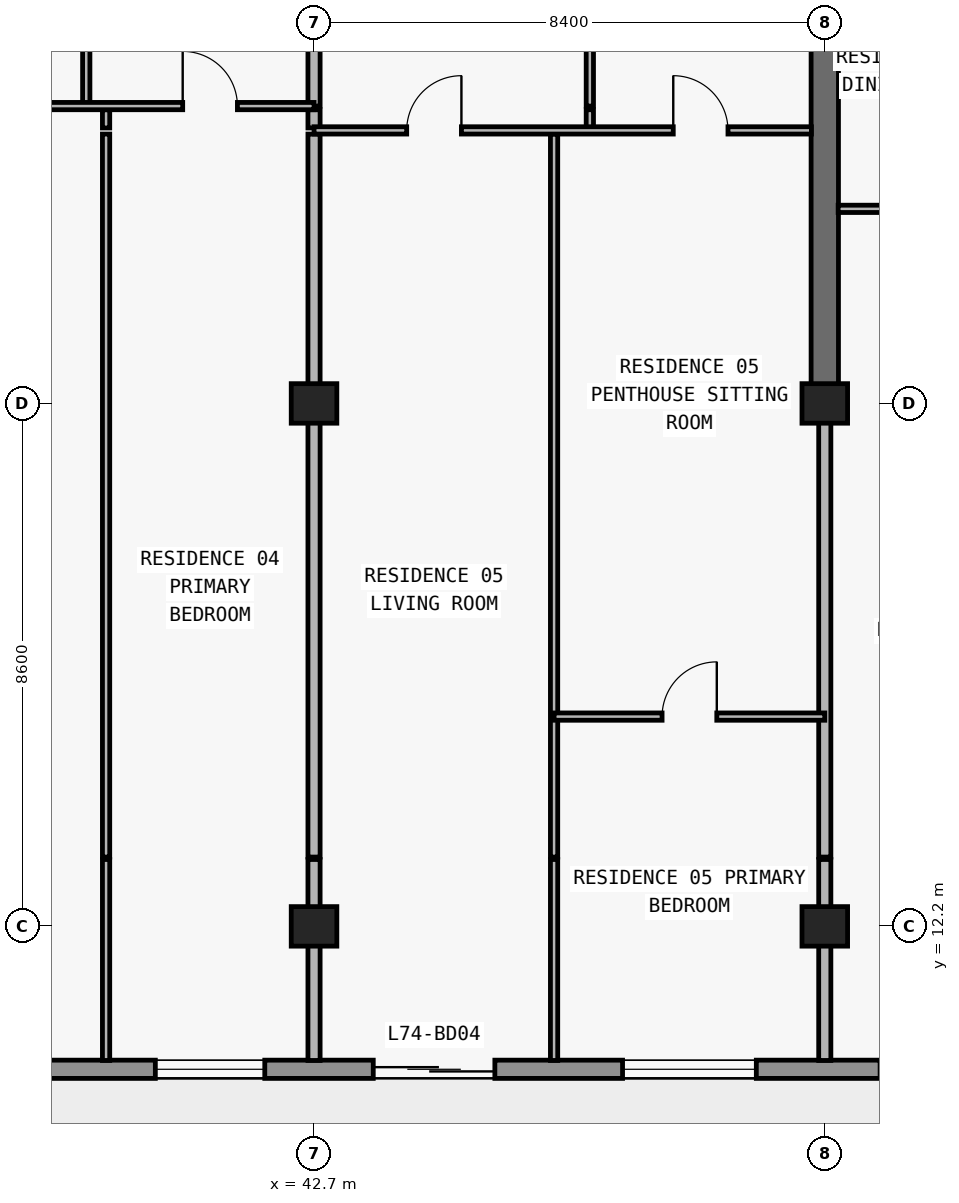
"""IFC4 building model, lengths in metres.
Left out: names, types, materials, properties, quantities, classifications, styles, units other than length and angle.
Written with IfcOpenShell. Run it as: python <this file> out.ifc"""

import sys

from ifc_helpers import new_model, si_unit, direction, frame, frame_2d, origin, origin_2d, place, context, subcontext, project, spatial, rectangle, extrude, element, fill, save


model = new_model("IFC4")
c1 = context("Model", 3, precision=1e-05, world=origin(), true_north=direction((0.0, 1.0)))
c2 = subcontext(c1, "Body", "Model", "MODEL_VIEW")
j1 = project(units=[si_unit("LENGTHUNIT", "METRE"), si_unit("PLANEANGLEUNIT", "RADIAN")], contexts=[c1])
p1 = place(None, origin())
s1 = spatial("IfcSite", under=j1, at=p1, CompositionType="ELEMENT")
p2 = place(p1, origin())
s2 = spatial("IfcBuilding", under=s1, at=p2, CompositionType="ELEMENT")
p3 = place(p2, frame((0.0, 0.0, 262.8)))
s3 = spatial("IfcBuildingStorey", under=s2, at=p3, CompositionType="ELEMENT", Elevation=262.8)
for number, where, z_axis, x_axis in (
    (1, (42.7, 12.2, 0.0), (0.0, 0.0, 1.0), (1.0, 0.0, 0.0)),
    (2, (51.1, 12.2, 0.0), (0.0, 0.0, 1.0), (1.0, 0.0, 0.0)),
    (3, (42.7, 20.8, 0.0), (0.0, 0.0, 1.0), (1.0, 0.0, 0.0)),
    (4, (51.1, 20.8, 0.0), (0.0, 0.0, 1.0), (1.0, 0.0, 0.0)),
):
    element("IfcColumn", number, at=place(p3, frame(where, z_axis=z_axis, x_axis=x_axis)), inside=s3, PredefinedType="COLUMN", context=c2, shape_type="SweptSolid", body=[
        extrude(rectangle(XDim=0.75, YDim=0.65, at=origin_2d()), origin(), (0.0, 0.0, 1.0), 3.05),
    ])
p4 = place(p3, frame((51.1, 20.8, 0.0), z_axis=(0.0, 0.0, 1.0), x_axis=(0.0, 1.0, 0.0)))
e5 = element("IfcWall", 5, at=p4, inside=s3, PredefinedType="SHEAR", context=c2, shape_type="SweptSolid", body=[
    extrude(rectangle(XDim=8.6, YDim=0.45, at=frame_2d((4.3, 0.0))), origin(), (0.0, 0.0, 1.0), 3.05),
])
p5 = place(p3, frame((65.7, 9.85, 0.0), z_axis=(0.0, 0.0, 1.0), x_axis=(-1.0, 0.0, 0.0)))
e6 = element("IfcWall", 6, at=p5, inside=s3, PredefinedType="STANDARD", context=c2, shape_type="SweptSolid", body=[
    extrude(rectangle(XDim=53.6, YDim=0.3, at=frame_2d((26.8, 0.0))), origin(), (0.0, 0.0, 1.0), 3.05),
])
p6 = place(p5, frame((48.05, 0.0, 0.85)))
e7 = element("IfcOpeningElement", 7, at=p6, cuts=e6, PredefinedType="OPENING", context=c2, shape_type="SweptSolid", body=[
    extrude(rectangle(XDim=1.8, YDim=1.55, at=frame_2d((0.9, 0.775))), frame((0.0, 0.16, 0.0), z_axis=(0.0, -1.0, 0.0), x_axis=(1.0, 0.0, 0.0)), (0.0, 0.0, 1.0), 0.32),
])
p7 = place(p5, frame((44.09, 0.0, 0.0)))
e8 = element("IfcOpeningElement", 8, at=p7, cuts=e6, PredefinedType="OPENING", context=c2, shape_type="SweptSolid", body=[
    extrude(rectangle(XDim=2.0, YDim=2.3, at=frame_2d((1.0, 1.15))), frame((0.0, 0.16, 0.0), z_axis=(0.0, -1.0, 0.0), x_axis=(1.0, 0.0, 0.0)), (0.0, 0.0, 1.0), 0.32),
])
p8 = place(p5, frame((39.99, 0.0, 0.85)))
e9 = element("IfcOpeningElement", 9, at=p8, cuts=e6, PredefinedType="OPENING", context=c2, shape_type="SweptSolid", body=[
    extrude(rectangle(XDim=1.8, YDim=1.55, at=frame_2d((0.9, 0.775))), frame((0.0, 0.16, 0.0), z_axis=(0.0, -1.0, 0.0), x_axis=(1.0, 0.0, 0.0)), (0.0, 0.0, 1.0), 0.32),
])
p9 = place(p5, frame((36.026, 0.0, 0.0)))
e10 = element("IfcOpeningElement", 10, at=p9, cuts=e6, PredefinedType="OPENING", context=c2, shape_type="SweptSolid", body=[
    extrude(rectangle(XDim=2.0, YDim=2.3, at=frame_2d((1.0, 1.15))), frame((0.0, 0.16, 0.0), z_axis=(0.0, -1.0, 0.0), x_axis=(1.0, 0.0, 0.0)), (0.0, 0.0, 1.0), 0.32),
])
p10 = place(p5, frame((31.726, 0.0, 0.85)))
e11 = element("IfcOpeningElement", 11, at=p10, cuts=e6, PredefinedType="OPENING", context=c2, shape_type="SweptSolid", body=[
    extrude(rectangle(XDim=2.2, YDim=1.55, at=frame_2d((1.1, 0.775))), frame((0.0, 0.16, 0.0), z_axis=(0.0, -1.0, 0.0), x_axis=(1.0, 0.0, 0.0)), (0.0, 0.0, 1.0), 0.32),
])
p11 = place(p5, frame((27.51, 0.0, 0.0)))
e12 = element("IfcOpeningElement", 12, at=p11, cuts=e6, PredefinedType="OPENING", context=c2, shape_type="SweptSolid", body=[
    extrude(rectangle(XDim=2.0, YDim=2.3, at=frame_2d((1.0, 1.15))), frame((0.0, 0.16, 0.0), z_axis=(0.0, -1.0, 0.0), x_axis=(1.0, 0.0, 0.0)), (0.0, 0.0, 1.0), 0.32),
])
p12 = place(p5, frame((23.81, 0.0, 0.85)))
e13 = element("IfcOpeningElement", 13, at=p12, cuts=e6, PredefinedType="OPENING", context=c2, shape_type="SweptSolid", body=[
    extrude(rectangle(XDim=1.8, YDim=1.55, at=frame_2d((0.9, 0.775))), frame((0.0, 0.16, 0.0), z_axis=(0.0, -1.0, 0.0), x_axis=(1.0, 0.0, 0.0)), (0.0, 0.0, 1.0), 0.32),
])
p13 = place(p5, frame((20.026, 0.0, 0.0)))
e14 = element("IfcOpeningElement", 14, at=p13, cuts=e6, PredefinedType="OPENING", context=c2, shape_type="SweptSolid", body=[
    extrude(rectangle(XDim=2.0, YDim=2.3, at=frame_2d((1.0, 1.15))), frame((0.0, 0.16, 0.0), z_axis=(0.0, -1.0, 0.0), x_axis=(1.0, 0.0, 0.0)), (0.0, 0.0, 1.0), 0.32),
])
p14 = place(p5, frame((15.726, 0.0, 0.85)))
e15 = element("IfcOpeningElement", 15, at=p14, cuts=e6, PredefinedType="OPENING", context=c2, shape_type="SweptSolid", body=[
    extrude(rectangle(XDim=2.2, YDim=1.55, at=frame_2d((1.1, 0.775))), frame((0.0, 0.16, 0.0), z_axis=(0.0, -1.0, 0.0), x_axis=(1.0, 0.0, 0.0)), (0.0, 0.0, 1.0), 0.32),
])
p15 = place(p5, frame((11.69, 0.0, 0.0)))
e16 = element("IfcOpeningElement", 16, at=p15, cuts=e6, PredefinedType="OPENING", context=c2, shape_type="SweptSolid", body=[
    extrude(rectangle(XDim=2.0, YDim=2.3, at=frame_2d((1.0, 1.15))), frame((0.0, 0.16, 0.0), z_axis=(0.0, -1.0, 0.0), x_axis=(1.0, 0.0, 0.0)), (0.0, 0.0, 1.0), 0.32),
])
p16 = place(p5, frame((7.01, 0.0, 0.65)))
e17 = element("IfcOpeningElement", 17, at=p16, cuts=e6, PredefinedType="OPENING", context=c2, shape_type="SweptSolid", body=[
    extrude(rectangle(XDim=2.6, YDim=1.85, at=frame_2d((1.3, 0.925))), frame((0.0, 0.16, 0.0), z_axis=(0.0, -1.0, 0.0), x_axis=(1.0, 0.0, 0.0)), (0.0, 0.0, 1.0), 0.32),
])
p17 = place(p5, frame((2.0, 0.0, 0.85)))
e18 = element("IfcOpeningElement", 18, at=p17, cuts=e6, PredefinedType="OPENING", context=c2, shape_type="SweptSolid", body=[
    extrude(rectangle(XDim=2.2, YDim=1.55, at=frame_2d((1.1, 0.775))), frame((0.0, 0.16, 0.0), z_axis=(0.0, -1.0, 0.0), x_axis=(1.0, 0.0, 0.0)), (0.0, 0.0, 1.0), 0.32),
])
p18 = place(p3, frame((38.954, 25.69, 0.0), z_axis=(0.0, 0.0, 1.0), x_axis=(0.0, 1.0, 0.0)))
e19 = element("IfcWall", 19, at=p18, inside=s3, PredefinedType="PARTITIONING", context=c2, shape_type="SweptSolid", body=[
    extrude(rectangle(XDim=4.69, YDim=0.12, at=frame_2d((2.345, 0.0))), origin(), (0.0, 0.0, 1.0), 2.725),
])
p19 = place(p18, frame((1.895, 0.0, 0.0)))
e20 = element("IfcOpeningElement", 20, at=p19, cuts=e19, PredefinedType="OPENING", context=c2, shape_type="SweptSolid", body=[
    extrude(rectangle(XDim=0.9, YDim=2.15, at=frame_2d((0.45, 1.075))), frame((0.0, 0.07, 0.0), z_axis=(0.0, -1.0, 0.0), x_axis=(1.0, 0.0, 0.0)), (0.0, 0.0, 1.0), 0.14),
])
p20 = place(p3, frame((39.28, 9.995, 0.0), z_axis=(0.0, 0.0, 1.0), x_axis=(0.0, 1.0, 0.0)))
e21 = element("IfcWall", 21, at=p20, inside=s3, PredefinedType="PARTITIONING", context=c2, shape_type="SweptSolid", body=[
    extrude(rectangle(XDim=3.305, YDim=0.12, at=frame_2d((1.652, 0.0))), origin(), (0.0, 0.0, 1.0), 3.05),
])
p21 = place(p3, frame((39.28, 13.34, 0.0), z_axis=(0.0, 0.0, 1.0), x_axis=(0.0, 1.0, 0.0)))
e22 = element("IfcWall", 22, at=p21, inside=s3, PredefinedType="PARTITIONING", context=c2, shape_type="SweptSolid", body=[
    extrude(rectangle(XDim=11.89, YDim=0.12, at=frame_2d((5.945, 0.0))), origin(), (0.0, 0.0, 1.0), 3.05),
])
p22 = place(p3, frame((39.28, 25.33, 0.0), z_axis=(0.0, 0.0, 1.0), x_axis=(0.0, 1.0, 0.0)))
e23 = element("IfcWall", 23, at=p22, inside=s3, PredefinedType="PARTITIONING", context=c2, shape_type="SweptSolid", body=[
    extrude(rectangle(XDim=0.3, YDim=0.12, at=frame_2d((0.15, 0.0))), origin(), (0.0, 0.0, 1.0), 3.05),
])
p23 = place(p3, frame((42.7, 9.995, 0.0), z_axis=(0.0, 0.0, 1.0), x_axis=(0.0, 1.0, 0.0)))
e24 = element("IfcWall", 24, at=p23, inside=s3, PredefinedType="PARTITIONING", context=c2, shape_type="SweptSolid", body=[
    extrude(rectangle(XDim=3.305, YDim=0.2, at=frame_2d((1.652, 0.0))), origin(), (0.0, 0.0, 1.0), 2.263),
])
p24 = place(p3, frame((42.7, 13.34, 0.0), z_axis=(0.0, 0.0, 1.0), x_axis=(0.0, 1.0, 0.0)))
e25 = element("IfcWall", 25, at=p24, inside=s3, PredefinedType="PARTITIONING", context=c2, shape_type="SweptSolid", body=[
    extrude(rectangle(XDim=11.89, YDim=0.2, at=frame_2d((5.945, 0.0))), origin(), (0.0, 0.0, 1.0), 2.263),
])
p25 = place(p3, frame((42.7, 25.33, 0.0), z_axis=(0.0, 0.0, 1.0), x_axis=(0.0, 1.0, 0.0)))
e26 = element("IfcWall", 26, at=p25, inside=s3, PredefinedType="PARTITIONING", context=c2, shape_type="SweptSolid", body=[
    extrude(rectangle(XDim=0.3, YDim=0.2, at=frame_2d((0.15, 0.0))), origin(), (0.0, 0.0, 1.0), 2.263),
])
p26 = place(p3, frame((42.7, 25.69, 0.0), z_axis=(0.0, 0.0, 1.0), x_axis=(0.0, 1.0, 0.0)))
e27 = element("IfcWall", 27, at=p26, inside=s3, PredefinedType="PARTITIONING", context=c2, shape_type="SweptSolid", body=[
    extrude(rectangle(XDim=4.69, YDim=0.2, at=frame_2d((2.345, 0.0))), origin(), (0.0, 0.0, 1.0), 2.263),
])
p27 = place(p3, frame((46.648, 9.995, 0.0), z_axis=(0.0, 0.0, 1.0), x_axis=(0.0, 1.0, 0.0)))
e28 = element("IfcWall", 28, at=p27, inside=s3, PredefinedType="PARTITIONING", context=c2, shape_type="SweptSolid", body=[
    extrude(rectangle(XDim=3.305, YDim=0.12, at=frame_2d((1.652, 0.0))), origin(), (0.0, 0.0, 1.0), 3.05),
])
p28 = place(p3, frame((46.648, 13.34, 0.0), z_axis=(0.0, 0.0, 1.0), x_axis=(0.0, 1.0, 0.0)))
e29 = element("IfcWall", 29, at=p28, inside=s3, PredefinedType="PARTITIONING", context=c2, shape_type="SweptSolid", body=[
    extrude(rectangle(XDim=11.89, YDim=0.12, at=frame_2d((5.945, 0.0))), origin(), (0.0, 0.0, 1.0), 3.05),
])
p29 = place(p3, frame((47.236, 25.33, 0.0), z_axis=(0.0, 0.0, 1.0), x_axis=(0.0, 1.0, 0.0)))
e30 = element("IfcWall", 30, at=p29, inside=s3, PredefinedType="PARTITIONING", context=c2, shape_type="SweptSolid", body=[
    extrude(rectangle(XDim=0.3, YDim=0.12, at=frame_2d((0.15, 0.0))), origin(), (0.0, 0.0, 1.0), 3.05),
])
p30 = place(p3, frame((47.236, 25.69, 0.0), z_axis=(0.0, 0.0, 1.0), x_axis=(0.0, 1.0, 0.0)))
e31 = element("IfcWall", 31, at=p30, inside=s3, PredefinedType="PARTITIONING", context=c2, shape_type="SweptSolid", body=[
    extrude(rectangle(XDim=4.69, YDim=0.12, at=frame_2d((2.345, 0.0))), origin(), (0.0, 0.0, 1.0), 3.05),
])
p31 = place(p30, frame((1.895, 0.0, 0.0)))
e32 = element("IfcOpeningElement", 32, at=p31, cuts=e31, PredefinedType="OPENING", context=c2, shape_type="SweptSolid", body=[
    extrude(rectangle(XDim=0.9, YDim=2.15, at=frame_2d((0.45, 1.075))), frame((0.0, 0.07, 0.0), z_axis=(0.0, -1.0, 0.0), x_axis=(1.0, 0.0, 0.0)), (0.0, 0.0, 1.0), 0.14),
])
p32 = place(p3, frame((51.1, 9.995, 0.0), z_axis=(0.0, 0.0, 1.0), x_axis=(0.0, 1.0, 0.0)))
e33 = element("IfcWall", 33, at=p32, inside=s3, PredefinedType="PARTITIONING", context=c2, shape_type="SweptSolid", body=[
    extrude(rectangle(XDim=3.305, YDim=0.2, at=frame_2d((1.652, 0.0))), origin(), (0.0, 0.0, 1.0), 2.263),
])
p33 = place(p3, frame((51.1, 13.34, 0.0), z_axis=(0.0, 0.0, 1.0), x_axis=(0.0, 1.0, 0.0)))
e34 = element("IfcWall", 34, at=p33, inside=s3, PredefinedType="PARTITIONING", context=c2, shape_type="SweptSolid", body=[
    extrude(rectangle(XDim=7.455, YDim=0.2, at=frame_2d((3.728, 0.0))), origin(), (0.0, 0.0, 1.0), 2.263),
])
p34 = place(p3, frame((46.648, 15.65, 0.0), z_axis=(0.0, 0.0, 1.0), x_axis=(1.0, 0.0, 0.0)))
e35 = element("IfcWall", 35, at=p34, inside=s3, PredefinedType="PARTITIONING", context=c2, shape_type="SweptSolid", body=[
    extrude(rectangle(XDim=4.452, YDim=0.12, at=frame_2d((2.226, 0.0))), origin(), (0.0, 0.0, 1.0), 3.05),
])
p35 = place(p34, frame((1.776, 0.0, 0.0)))
e36 = element("IfcOpeningElement", 36, at=p35, cuts=e35, PredefinedType="OPENING", context=c2, shape_type="SweptSolid", body=[
    extrude(rectangle(XDim=0.9, YDim=2.15, at=frame_2d((0.45, 1.075))), frame((0.0, 0.07, 0.0), z_axis=(0.0, -1.0, 0.0), x_axis=(1.0, 0.0, 0.0)), (0.0, 0.0, 1.0), 0.14),
])
p36 = place(p3, frame((51.32, 24.0, 0.0), z_axis=(0.0, 0.0, 1.0), x_axis=(1.0, 0.0, 0.0)))
e37 = element("IfcWall", 37, at=p36, inside=s3, PredefinedType="PARTITIONING", context=c2, shape_type="SweptSolid", body=[
    extrude(rectangle(XDim=8.18, YDim=0.12, at=frame_2d((4.09, 0.0))), origin(), (0.0, 0.0, 1.0), 3.05),
])
p37 = place(p36, frame((1.204, 0.0, 0.0)))
e38 = element("IfcOpeningElement", 38, at=p37, cuts=e37, PredefinedType="OPENING", context=c2, shape_type="SweptSolid", body=[
    extrude(rectangle(XDim=0.9, YDim=2.15, at=frame_2d((0.45, 1.075))), frame((0.0, 0.07, 0.0), z_axis=(0.0, -1.0, 0.0), x_axis=(1.0, 0.0, 0.0)), (0.0, 0.0, 1.0), 0.14),
])
p38 = place(p3, frame((42.7, 25.29, 0.0), z_axis=(0.0, 0.0, 1.0), x_axis=(1.0, 0.0, 0.0)))
e39 = element("IfcWall", 39, at=p38, inside=s3, PredefinedType="PARTITIONING", context=c2, shape_type="SweptSolid", body=[
    extrude(rectangle(XDim=8.18, YDim=0.12, at=frame_2d((4.09, 0.0))), origin(), (0.0, 0.0, 1.0), 3.05),
])
p39 = place(p38, frame((1.524, 0.0, 0.0)))
e40 = element("IfcOpeningElement", 40, at=p39, cuts=e39, PredefinedType="OPENING", context=c2, shape_type="SweptSolid", body=[
    extrude(rectangle(XDim=0.9, YDim=2.15, at=frame_2d((0.45, 1.075))), frame((0.0, 0.07, 0.0), z_axis=(0.0, -1.0, 0.0), x_axis=(1.0, 0.0, 0.0)), (0.0, 0.0, 1.0), 0.14),
])
p40 = place(p38, frame((5.908, 0.0, 0.0)))
e41 = element("IfcOpeningElement", 41, at=p40, cuts=e39, PredefinedType="OPENING", context=c2, shape_type="SweptSolid", body=[
    extrude(rectangle(XDim=0.9, YDim=2.15, at=frame_2d((0.45, 1.075))), frame((0.0, 0.07, 0.0), z_axis=(0.0, -1.0, 0.0), x_axis=(1.0, 0.0, 0.0)), (0.0, 0.0, 1.0), 0.14),
])
p41 = place(p3, frame((35.1, 25.69, 0.0), z_axis=(0.0, 0.0, 1.0), x_axis=(1.0, 0.0, 0.0)))
e42 = element("IfcWall", 42, at=p41, inside=s3, PredefinedType="PARTITIONING", context=c2, shape_type="SweptSolid", body=[
    extrude(rectangle(XDim=7.6, YDim=0.12, at=frame_2d((3.8, 0.0))), origin(), (0.0, 0.0, 1.0), 3.05),
])
p42 = place(p41, frame((1.477, 0.0, 0.0)))
e43 = element("IfcOpeningElement", 43, at=p42, cuts=e42, PredefinedType="OPENING", context=c2, shape_type="SweptSolid", body=[
    extrude(rectangle(XDim=0.9, YDim=2.15, at=frame_2d((0.45, 1.075))), frame((0.0, 0.07, 0.0), z_axis=(0.0, -1.0, 0.0), x_axis=(1.0, 0.0, 0.0)), (0.0, 0.0, 1.0), 0.14),
])
p43 = place(p41, frame((5.44, 0.0, 0.0)))
e44 = element("IfcOpeningElement", 44, at=p43, cuts=e42, PredefinedType="OPENING", context=c2, shape_type="SweptSolid", body=[
    extrude(rectangle(XDim=0.9, YDim=2.15, at=frame_2d((0.45, 1.075))), frame((0.0, 0.07, 0.0), z_axis=(0.0, -1.0, 0.0), x_axis=(1.0, 0.0, 0.0)), (0.0, 0.0, 1.0), 0.14),
])
p44 = place(p12, origin())
e45 = element("IfcWindow", 45, at=p44, inside=s3, PartitioningType="SINGLE_PANEL", PredefinedType="WINDOW", context=c2, shape_type="SweptSolid", body=[
    extrude(rectangle(XDim=1.8, YDim=1.55, at=frame_2d((0.9, 0.775))), frame((0.0, 0.03, 0.0), z_axis=(0.0, -1.0, 0.0), x_axis=(1.0, 0.0, 0.0)), (0.0, 0.0, 1.0), 0.06),
])
fill(e13, e45)
p45 = place(p13, origin())
e46 = element("IfcDoor", 46, at=p45, inside=s3, OperationType="DOUBLE_DOOR_SLIDING", PredefinedType="DOOR", context=c2, shape_type="SweptSolid", body=[
    extrude(rectangle(XDim=2.0, YDim=2.3, at=frame_2d((1.0, 1.15))), frame((0.0, 0.025, 0.0), z_axis=(0.0, -1.0, 0.0), x_axis=(1.0, 0.0, 0.0)), (0.0, 0.0, 1.0), 0.05),
])
fill(e14, e46)
p46 = place(p14, origin())
e47 = element("IfcWindow", 47, at=p46, inside=s3, PartitioningType="SINGLE_PANEL", PredefinedType="WINDOW", context=c2, shape_type="SweptSolid", body=[
    extrude(rectangle(XDim=2.2, YDim=1.55, at=frame_2d((1.1, 0.775))), frame((0.0, 0.03, 0.0), z_axis=(0.0, -1.0, 0.0), x_axis=(1.0, 0.0, 0.0)), (0.0, 0.0, 1.0), 0.06),
])
fill(e15, e47)
p47 = place(p43, origin())
e48 = element("IfcDoor", 48, at=p47, inside=s3, OperationType="SINGLE_SWING_LEFT", PredefinedType="DOOR", context=c2, shape_type="SweptSolid", body=[
    extrude(rectangle(XDim=0.9, YDim=2.15, at=frame_2d((0.45, 1.075))), frame((0.0, 0.025, 0.0), z_axis=(0.0, -1.0, 0.0), x_axis=(1.0, 0.0, 0.0)), (0.0, 0.0, 1.0), 0.05),
])
fill(e44, e48)
p48 = place(p39, origin())
e49 = element("IfcDoor", 49, at=p48, inside=s3, OperationType="SINGLE_SWING_RIGHT", PredefinedType="DOOR", context=c2, shape_type="SweptSolid", body=[
    extrude(rectangle(XDim=0.9, YDim=2.15, at=frame_2d((0.45, 1.075))), frame((0.0, 0.025, 0.0), z_axis=(0.0, -1.0, 0.0), x_axis=(1.0, 0.0, 0.0)), (0.0, 0.0, 1.0), 0.05),
])
fill(e40, e49)
p49 = place(p40, origin())
e50 = element("IfcDoor", 50, at=p49, inside=s3, OperationType="SINGLE_SWING_LEFT", PredefinedType="DOOR", context=c2, shape_type="SweptSolid", body=[
    extrude(rectangle(XDim=0.9, YDim=2.15, at=frame_2d((0.45, 1.075))), frame((0.0, 0.025, 0.0), z_axis=(0.0, -1.0, 0.0), x_axis=(1.0, 0.0, 0.0)), (0.0, 0.0, 1.0), 0.05),
])
fill(e41, e50)
p50 = place(p35, origin())
e51 = element("IfcDoor", 51, at=p50, inside=s3, OperationType="SINGLE_SWING_RIGHT", PredefinedType="DOOR", context=c2, shape_type="SweptSolid", body=[
    extrude(rectangle(XDim=0.9, YDim=2.15, at=frame_2d((0.45, 1.075))), frame((0.0, 0.025, 0.0), z_axis=(0.0, -1.0, 0.0), x_axis=(1.0, 0.0, 0.0)), (0.0, 0.0, 1.0), 0.05),
])
fill(e36, e51)
save(model, sys.argv[1])
